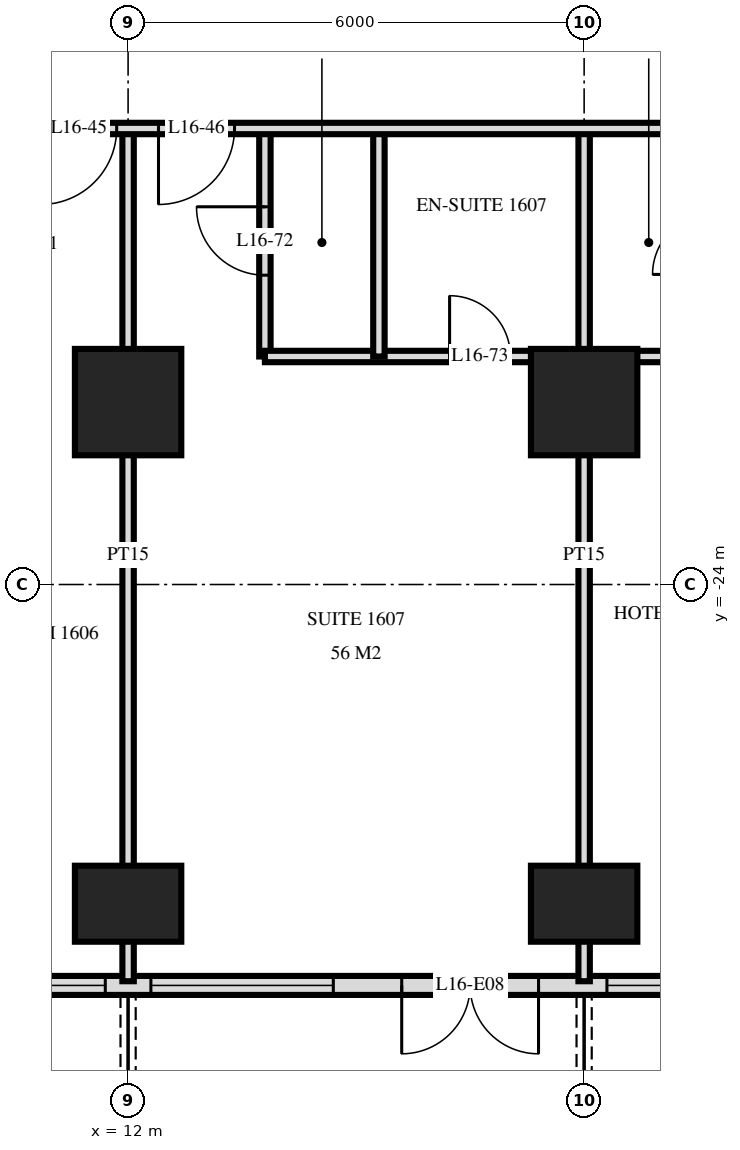
"""IFC4 building model, lengths in metres.
Left out: names, types, materials, properties, quantities, classifications, styles, units other than length and angle.
Written with IfcOpenShell. Run it as: python <this file> out.ifc"""

import sys

from ifc_helpers import new_model, si_unit, direction, frame, frame_2d, origin, origin_2d, place, context, subcontext, project, spatial, rectangle, extrude, element, fill, save


model = new_model("IFC4")
c1 = context("Model", 3, precision=1e-05, world=origin(), true_north=direction((0.0, 1.0)))
c2 = subcontext(c1, "Body", "Model", "MODEL_VIEW")
j1 = project(units=[si_unit("LENGTHUNIT", "METRE"), si_unit("PLANEANGLEUNIT", "RADIAN")], contexts=[c1])
p1 = place(None, origin())
s1 = spatial("IfcSite", under=j1, at=p1, CompositionType="ELEMENT")
p2 = place(p1, origin())
s2 = spatial("IfcBuilding", under=s1, at=p2, CompositionType="ELEMENT")
p3 = place(p2, frame((0.0, 0.0, 67.2)))
s3 = spatial("IfcBuildingStorey", under=s2, at=p3, CompositionType="ELEMENT", Elevation=67.2)
p4 = place(p3, frame((12.0, -28.2, 0.0), z_axis=(0.0, 0.0, 1.0), x_axis=(1.0, 0.0, 0.0)))
e1 = element("IfcColumn", 1, at=p4, inside=s3, PredefinedType="COLUMN", context=c2, shape_type="SweptSolid", body=[
    extrude(rectangle(XDim=1.4, YDim=1.0, at=origin_2d()), origin(), (0.0, 0.0, 1.0), 3.6),
])
p5 = place(p3, frame((12.0, -21.6, 0.0), z_axis=(0.0, 0.0, 1.0), x_axis=(1.0, 0.0, 0.0)))
e2 = element("IfcColumn", 2, at=p5, inside=s3, PredefinedType="COLUMN", context=c2, shape_type="SweptSolid", body=[
    extrude(rectangle(XDim=1.4, YDim=1.4, at=origin_2d()), origin(), (0.0, 0.0, 1.0), 3.6),
])
p6 = place(p3, frame((18.0, -28.2, 0.0), z_axis=(0.0, 0.0, 1.0), x_axis=(1.0, 0.0, 0.0)))
e3 = element("IfcColumn", 3, at=p6, inside=s3, PredefinedType="COLUMN", context=c2, shape_type="SweptSolid", body=[
    extrude(rectangle(XDim=1.4, YDim=1.0, at=origin_2d()), origin(), (0.0, 0.0, 1.0), 3.6),
])
p7 = place(p3, frame((18.0, -21.6, 0.0), z_axis=(0.0, 0.0, 1.0), x_axis=(1.0, 0.0, 0.0)))
e4 = element("IfcColumn", 4, at=p7, inside=s3, PredefinedType="COLUMN", context=c2, shape_type="SweptSolid", body=[
    extrude(rectangle(XDim=1.4, YDim=1.4, at=origin_2d()), origin(), (0.0, 0.0, 1.0), 3.6),
])
p8 = place(p3, frame((-28.775, -29.275, 0.0), z_axis=(0.0, 0.0, 1.0), x_axis=(1.0, 0.0, 0.0)))
e5 = element("IfcWall", 5, at=p8, inside=s3, PredefinedType="SOLIDWALL", context=c2, shape_type="SweptSolid", body=[
    extrude(rectangle(XDim=57.551, YDim=0.25, at=frame_2d((28.775, 0.0))), origin(), (0.0, 0.0, 1.0), 3.32),
])
p9 = place(p8, frame((0.575, 0.0, 0.0)))
e6 = element("IfcOpeningElement", 6, at=p9, cuts=e5, PredefinedType="OPENING", context=c2, shape_type="SweptSolid", body=[
    extrude(rectangle(XDim=1.8, YDim=2.4, at=frame_2d((0.9, 1.2))), frame((0.0, 0.135, 0.0), z_axis=(0.0, -1.0, 0.0), x_axis=(1.0, 0.0, 0.0)), (0.0, 0.0, 1.0), 0.27),
])
p10 = place(p8, frame((5.075, 0.0, 0.3)))
e7 = element("IfcOpeningElement", 7, at=p10, cuts=e5, PredefinedType="OPENING", context=c2, shape_type="SweptSolid", body=[
    extrude(rectangle(XDim=2.4, YDim=2.1, at=frame_2d((1.2, 1.05))), frame((0.0, 0.135, 0.0), z_axis=(0.0, -1.0, 0.0), x_axis=(1.0, 0.0, 0.0)), (0.0, 0.0, 1.0), 0.27),
])
p11 = place(p8, frame((8.375, 0.0, 0.0)))
e8 = element("IfcOpeningElement", 8, at=p11, cuts=e5, PredefinedType="OPENING", context=c2, shape_type="SweptSolid", body=[
    extrude(rectangle(XDim=1.8, YDim=2.4, at=frame_2d((0.9, 1.2))), frame((0.0, 0.135, 0.0), z_axis=(0.0, -1.0, 0.0), x_axis=(1.0, 0.0, 0.0)), (0.0, 0.0, 1.0), 0.27),
])
p12 = place(p8, frame((11.375, 0.0, 0.0)))
e9 = element("IfcOpeningElement", 9, at=p12, cuts=e5, PredefinedType="OPENING", context=c2, shape_type="SweptSolid", body=[
    extrude(rectangle(XDim=1.8, YDim=2.4, at=frame_2d((0.9, 1.2))), frame((0.0, 0.135, 0.0), z_axis=(0.0, -1.0, 0.0), x_axis=(1.0, 0.0, 0.0)), (0.0, 0.0, 1.0), 0.27),
])
p13 = place(p8, frame((14.075, 0.0, 0.3)))
e10 = element("IfcOpeningElement", 10, at=p13, cuts=e5, PredefinedType="OPENING", context=c2, shape_type="SweptSolid", body=[
    extrude(rectangle(XDim=2.4, YDim=2.1, at=frame_2d((1.2, 1.05))), frame((0.0, 0.135, 0.0), z_axis=(0.0, -1.0, 0.0), x_axis=(1.0, 0.0, 0.0)), (0.0, 0.0, 1.0), 0.27),
])
p14 = place(p8, frame((17.375, 0.0, 0.0)))
e11 = element("IfcOpeningElement", 11, at=p14, cuts=e5, PredefinedType="OPENING", context=c2, shape_type="SweptSolid", body=[
    extrude(rectangle(XDim=1.8, YDim=2.4, at=frame_2d((0.9, 1.2))), frame((0.0, 0.135, 0.0), z_axis=(0.0, -1.0, 0.0), x_axis=(1.0, 0.0, 0.0)), (0.0, 0.0, 1.0), 0.27),
])
p15 = place(p8, frame((20.075, 0.0, 0.3)))
e12 = element("IfcOpeningElement", 12, at=p15, cuts=e5, PredefinedType="OPENING", context=c2, shape_type="SweptSolid", body=[
    extrude(rectangle(XDim=2.4, YDim=2.1, at=frame_2d((1.2, 1.05))), frame((0.0, 0.135, 0.0), z_axis=(0.0, -1.0, 0.0), x_axis=(1.0, 0.0, 0.0)), (0.0, 0.0, 1.0), 0.27),
])
p16 = place(p8, frame((23.075, 0.0, 0.3)))
e13 = element("IfcOpeningElement", 13, at=p16, cuts=e5, PredefinedType="OPENING", context=c2, shape_type="SweptSolid", body=[
    extrude(rectangle(XDim=2.4, YDim=2.1, at=frame_2d((1.2, 1.05))), frame((0.0, 0.135, 0.0), z_axis=(0.0, -1.0, 0.0), x_axis=(1.0, 0.0, 0.0)), (0.0, 0.0, 1.0), 0.27),
])
p17 = place(p8, frame((26.375, 0.0, 0.0)))
e14 = element("IfcOpeningElement", 14, at=p17, cuts=e5, PredefinedType="OPENING", context=c2, shape_type="SweptSolid", body=[
    extrude(rectangle(XDim=1.8, YDim=2.4, at=frame_2d((0.9, 1.2))), frame((0.0, 0.135, 0.0), z_axis=(0.0, -1.0, 0.0), x_axis=(1.0, 0.0, 0.0)), (0.0, 0.0, 1.0), 0.27),
])
p18 = place(p8, frame((29.375, 0.0, 0.0)))
e15 = element("IfcOpeningElement", 15, at=p18, cuts=e5, PredefinedType="OPENING", context=c2, shape_type="SweptSolid", body=[
    extrude(rectangle(XDim=1.8, YDim=2.4, at=frame_2d((0.9, 1.2))), frame((0.0, 0.135, 0.0), z_axis=(0.0, -1.0, 0.0), x_axis=(1.0, 0.0, 0.0)), (0.0, 0.0, 1.0), 0.27),
])
p19 = place(p8, frame((32.075, 0.0, 0.3)))
e16 = element("IfcOpeningElement", 16, at=p19, cuts=e5, PredefinedType="OPENING", context=c2, shape_type="SweptSolid", body=[
    extrude(rectangle(XDim=2.4, YDim=2.1, at=frame_2d((1.2, 1.05))), frame((0.0, 0.135, 0.0), z_axis=(0.0, -1.0, 0.0), x_axis=(1.0, 0.0, 0.0)), (0.0, 0.0, 1.0), 0.27),
])
p20 = place(p8, frame((35.375, 0.0, 0.0)))
e17 = element("IfcOpeningElement", 17, at=p20, cuts=e5, PredefinedType="OPENING", context=c2, shape_type="SweptSolid", body=[
    extrude(rectangle(XDim=1.8, YDim=2.4, at=frame_2d((0.9, 1.2))), frame((0.0, 0.135, 0.0), z_axis=(0.0, -1.0, 0.0), x_axis=(1.0, 0.0, 0.0)), (0.0, 0.0, 1.0), 0.27),
])
p21 = place(p8, frame((38.075, 0.0, 0.3)))
e18 = element("IfcOpeningElement", 18, at=p21, cuts=e5, PredefinedType="OPENING", context=c2, shape_type="SweptSolid", body=[
    extrude(rectangle(XDim=2.4, YDim=2.1, at=frame_2d((1.2, 1.05))), frame((0.0, 0.135, 0.0), z_axis=(0.0, -1.0, 0.0), x_axis=(1.0, 0.0, 0.0)), (0.0, 0.0, 1.0), 0.27),
])
p22 = place(p8, frame((41.075, 0.0, 0.3)))
e19 = element("IfcOpeningElement", 19, at=p22, cuts=e5, PredefinedType="OPENING", context=c2, shape_type="SweptSolid", body=[
    extrude(rectangle(XDim=2.4, YDim=2.1, at=frame_2d((1.2, 1.05))), frame((0.0, 0.135, 0.0), z_axis=(0.0, -1.0, 0.0), x_axis=(1.0, 0.0, 0.0)), (0.0, 0.0, 1.0), 0.27),
])
p23 = place(p8, frame((44.375, 0.0, 0.0)))
e20 = element("IfcOpeningElement", 20, at=p23, cuts=e5, PredefinedType="OPENING", context=c2, shape_type="SweptSolid", body=[
    extrude(rectangle(XDim=1.8, YDim=2.4, at=frame_2d((0.9, 1.2))), frame((0.0, 0.135, 0.0), z_axis=(0.0, -1.0, 0.0), x_axis=(1.0, 0.0, 0.0)), (0.0, 0.0, 1.0), 0.27),
])
p24 = place(p8, frame((47.075, 0.0, 0.3)))
e21 = element("IfcOpeningElement", 21, at=p24, cuts=e5, PredefinedType="OPENING", context=c2, shape_type="SweptSolid", body=[
    extrude(rectangle(XDim=2.4, YDim=2.1, at=frame_2d((1.2, 1.05))), frame((0.0, 0.135, 0.0), z_axis=(0.0, -1.0, 0.0), x_axis=(1.0, 0.0, 0.0)), (0.0, 0.0, 1.0), 0.27),
])
p25 = place(p8, frame((50.375, 0.0, 0.0)))
e22 = element("IfcOpeningElement", 22, at=p25, cuts=e5, PredefinedType="OPENING", context=c2, shape_type="SweptSolid", body=[
    extrude(rectangle(XDim=1.8, YDim=2.4, at=frame_2d((0.9, 1.2))), frame((0.0, 0.135, 0.0), z_axis=(0.0, -1.0, 0.0), x_axis=(1.0, 0.0, 0.0)), (0.0, 0.0, 1.0), 0.27),
])
p26 = place(p8, frame((53.375, 0.0, 0.0)))
e23 = element("IfcOpeningElement", 23, at=p26, cuts=e5, PredefinedType="OPENING", context=c2, shape_type="SweptSolid", body=[
    extrude(rectangle(XDim=1.8, YDim=2.4, at=frame_2d((0.9, 1.2))), frame((0.0, 0.135, 0.0), z_axis=(0.0, -1.0, 0.0), x_axis=(1.0, 0.0, 0.0)), (0.0, 0.0, 1.0), 0.27),
])
p27 = place(p3, frame((18.0, -29.22, 0.0), z_axis=(0.0, 0.0, 1.0), x_axis=(0.0, 1.0, 0.0)))
e24 = element("IfcWall", 24, at=p27, inside=s3, PredefinedType="PARTITIONING", context=c2, shape_type="SweptSolid", body=[
    extrude(rectangle(XDim=11.22, YDim=0.15, at=frame_2d((5.61, 0.0))), origin(), (0.0, 0.0, 1.0), 3.32),
])
p28 = place(p3, frame((15.3, -21.0, 0.0), z_axis=(0.0, 0.0, 1.0), x_axis=(0.0, 1.0, 0.0)))
e25 = element("IfcWall", 25, at=p28, inside=s3, PredefinedType="PARTITIONING", context=c2, shape_type="SweptSolid", body=[
    extrude(rectangle(XDim=3.0, YDim=0.15, at=frame_2d((1.5, 0.0))), origin(), (0.0, 0.0, 1.0), 3.32),
])
p29 = place(p3, frame((13.8, -21.0, 0.0), z_axis=(0.0, 0.0, 1.0), x_axis=(0.0, 1.0, 0.0)))
e26 = element("IfcWall", 26, at=p29, inside=s3, PredefinedType="PARTITIONING", context=c2, shape_type="SweptSolid", body=[
    extrude(rectangle(XDim=3.0, YDim=0.15, at=frame_2d((1.5, 0.0))), origin(), (0.0, 0.0, 1.0), 3.32),
])
p30 = place(p29, frame((1.07, 0.0, 0.0)))
e27 = element("IfcOpeningElement", 27, at=p30, cuts=e26, PredefinedType="OPENING", context=c2, shape_type="SweptSolid", body=[
    extrude(rectangle(XDim=0.9, YDim=2.1, at=frame_2d((0.45, 1.05))), frame((0.0, 0.085, 0.0), z_axis=(0.0, -1.0, 0.0), x_axis=(1.0, 0.0, 0.0)), (0.0, 0.0, 1.0), 0.17),
])
p31 = place(p3, frame((12.0, -29.22, 0.0), z_axis=(0.0, 0.0, 1.0), x_axis=(0.0, 1.0, 0.0)))
e28 = element("IfcWall", 28, at=p31, inside=s3, PredefinedType="PARTITIONING", context=c2, shape_type="SweptSolid", body=[
    extrude(rectangle(XDim=11.22, YDim=0.15, at=frame_2d((5.61, 0.0))), origin(), (0.0, 0.0, 1.0), 3.32),
])
p32 = place(p3, frame((13.8, -21.0, 0.0), z_axis=(0.0, 0.0, 1.0), x_axis=(1.0, 0.0, 0.0)))
e29 = element("IfcWall", 29, at=p32, inside=s3, PredefinedType="PARTITIONING", context=c2, shape_type="SweptSolid", body=[
    extrude(rectangle(XDim=5.9, YDim=0.15, at=frame_2d((2.95, 0.0))), origin(), (0.0, 0.0, 1.0), 3.32),
])
p33 = place(p32, frame((2.43, 0.0, 0.0)))
e30 = element("IfcOpeningElement", 30, at=p33, cuts=e29, PredefinedType="OPENING", context=c2, shape_type="SweptSolid", body=[
    extrude(rectangle(XDim=0.8, YDim=2.1, at=frame_2d((0.4, 1.05))), frame((0.0, 0.085, 0.0), z_axis=(0.0, -1.0, 0.0), x_axis=(1.0, 0.0, 0.0)), (0.0, 0.0, 1.0), 0.17),
])
p34 = place(p3, frame((-33.12, -18.0, 0.0), z_axis=(0.0, 0.0, 1.0), x_axis=(1.0, 0.0, 0.0)))
e31 = element("IfcWall", 31, at=p34, inside=s3, PredefinedType="PARTITIONING", context=c2, shape_type="SweptSolid", body=[
    extrude(rectangle(XDim=66.24, YDim=0.15, at=frame_2d((33.12, 0.0))), origin(), (0.0, 0.0, 1.0), 3.32),
])
p35 = place(p34, frame((15.27, 0.0, 0.0)))
e32 = element("IfcOpeningElement", 32, at=p35, cuts=e31, PredefinedType="OPENING", context=c2, shape_type="SweptSolid", body=[
    extrude(rectangle(XDim=1.0, YDim=2.1, at=frame_2d((0.5, 1.05))), frame((0.0, 0.085, 0.0), z_axis=(0.0, -1.0, 0.0), x_axis=(1.0, 0.0, 0.0)), (0.0, 0.0, 1.0), 0.17),
])
p36 = place(p34, frame((21.22, 0.0, 0.0)))
e33 = element("IfcOpeningElement", 33, at=p36, cuts=e31, PredefinedType="OPENING", context=c2, shape_type="SweptSolid", body=[
    extrude(rectangle(XDim=1.0, YDim=2.1, at=frame_2d((0.5, 1.05))), frame((0.0, 0.085, 0.0), z_axis=(0.0, -1.0, 0.0), x_axis=(1.0, 0.0, 0.0)), (0.0, 0.0, 1.0), 0.17),
])
p37 = place(p34, frame((24.27, 0.0, 0.0)))
e34 = element("IfcOpeningElement", 34, at=p37, cuts=e31, PredefinedType="OPENING", context=c2, shape_type="SweptSolid", body=[
    extrude(rectangle(XDim=1.0, YDim=2.1, at=frame_2d((0.5, 1.05))), frame((0.0, 0.085, 0.0), z_axis=(0.0, -1.0, 0.0), x_axis=(1.0, 0.0, 0.0)), (0.0, 0.0, 1.0), 0.17),
])
p38 = place(p34, frame((30.97, 0.0, 0.0)))
e35 = element("IfcOpeningElement", 35, at=p38, cuts=e31, PredefinedType="OPENING", context=c2, shape_type="SweptSolid", body=[
    extrude(rectangle(XDim=1.0, YDim=2.1, at=frame_2d((0.5, 1.05))), frame((0.0, 0.085, 0.0), z_axis=(0.0, -1.0, 0.0), x_axis=(1.0, 0.0, 0.0)), (0.0, 0.0, 1.0), 0.17),
])
p39 = place(p34, frame((40.42, 0.0, 0.0)))
e36 = element("IfcOpeningElement", 36, at=p39, cuts=e31, PredefinedType="OPENING", context=c2, shape_type="SweptSolid", body=[
    extrude(rectangle(XDim=1.0, YDim=2.1, at=frame_2d((0.5, 1.05))), frame((0.0, 0.085, 0.0), z_axis=(0.0, -1.0, 0.0), x_axis=(1.0, 0.0, 0.0)), (0.0, 0.0, 1.0), 0.17),
])
p40 = place(p34, frame((43.97, 0.0, 0.0)))
e37 = element("IfcOpeningElement", 37, at=p40, cuts=e31, PredefinedType="OPENING", context=c2, shape_type="SweptSolid", body=[
    extrude(rectangle(XDim=1.0, YDim=2.1, at=frame_2d((0.5, 1.05))), frame((0.0, 0.085, 0.0), z_axis=(0.0, -1.0, 0.0), x_axis=(1.0, 0.0, 0.0)), (0.0, 0.0, 1.0), 0.17),
])
p41 = place(p34, frame((45.52, 0.0, 0.0)))
e38 = element("IfcOpeningElement", 38, at=p41, cuts=e31, PredefinedType="OPENING", context=c2, shape_type="SweptSolid", body=[
    extrude(rectangle(XDim=1.0, YDim=2.1, at=frame_2d((0.5, 1.05))), frame((0.0, 0.085, 0.0), z_axis=(0.0, -1.0, 0.0), x_axis=(1.0, 0.0, 0.0)), (0.0, 0.0, 1.0), 0.17),
])
p42 = place(p34, frame((52.97, 0.0, 0.0)))
e39 = element("IfcOpeningElement", 39, at=p42, cuts=e31, PredefinedType="OPENING", context=c2, shape_type="SweptSolid", body=[
    extrude(rectangle(XDim=1.0, YDim=2.1, at=frame_2d((0.5, 1.05))), frame((0.0, 0.085, 0.0), z_axis=(0.0, -1.0, 0.0), x_axis=(1.0, 0.0, 0.0)), (0.0, 0.0, 1.0), 0.17),
])
p43 = place(p34, frame((54.27, 0.0, 0.0)))
e40 = element("IfcOpeningElement", 40, at=p43, cuts=e31, PredefinedType="OPENING", context=c2, shape_type="SweptSolid", body=[
    extrude(rectangle(XDim=1.0, YDim=2.1, at=frame_2d((0.5, 1.05))), frame((0.0, 0.085, 0.0), z_axis=(0.0, -1.0, 0.0), x_axis=(1.0, 0.0, 0.0)), (0.0, 0.0, 1.0), 0.17),
])
p44 = place(p34, frame((13.42, 0.0, 0.0)))
e41 = element("IfcOpeningElement", 41, at=p44, cuts=e31, PredefinedType="OPENING", context=c2, shape_type="SweptSolid", body=[
    extrude(rectangle(XDim=1.0, YDim=2.1, at=frame_2d((0.5, 1.05))), frame((0.0, 0.085, 0.0), z_axis=(0.0, -1.0, 0.0), x_axis=(1.0, 0.0, 0.0)), (0.0, 0.0, 1.0), 0.17),
])
p45 = place(p34, frame((60.82, 0.0, 0.0)))
e42 = element("IfcOpeningElement", 42, at=p45, cuts=e31, PredefinedType="OPENING", context=c2, shape_type="SweptSolid", body=[
    extrude(rectangle(XDim=1.0, YDim=2.1, at=frame_2d((0.5, 1.05))), frame((0.0, 0.085, 0.0), z_axis=(0.0, -1.0, 0.0), x_axis=(1.0, 0.0, 0.0)), (0.0, 0.0, 1.0), 0.17),
])
p46 = place(p21, origin())
e43 = element("IfcWindow", 43, at=p46, inside=s3, PartitioningType="SINGLE_PANEL", PredefinedType="WINDOW", context=c2, shape_type="SweptSolid", body=[
    extrude(rectangle(XDim=2.4, YDim=2.1, at=frame_2d((1.2, 1.05))), frame((0.0, 0.03, 0.0), z_axis=(0.0, -1.0, 0.0), x_axis=(1.0, 0.0, 0.0)), (0.0, 0.0, 1.0), 0.06),
])
fill(e18, e43)
p47 = place(p22, origin())
e44 = element("IfcWindow", 44, at=p47, inside=s3, PartitioningType="SINGLE_PANEL", PredefinedType="WINDOW", context=c2, shape_type="SweptSolid", body=[
    extrude(rectangle(XDim=2.4, YDim=2.1, at=frame_2d((1.2, 1.05))), frame((0.0, 0.03, 0.0), z_axis=(0.0, -1.0, 0.0), x_axis=(1.0, 0.0, 0.0)), (0.0, 0.0, 1.0), 0.06),
])
fill(e19, e44)
p48 = place(p23, frame((0.9, 0.0, 0.0), z_axis=(0.0, 0.0, 1.0), x_axis=(-1.0, 0.0, 0.0)))
e45 = element("IfcDoor", 45, at=p48, inside=s3, OperationType="DOUBLE_DOOR_SINGLE_SWING", PredefinedType="DOOR", context=c2, shape_type="SweptSolid", body=[
    extrude(rectangle(XDim=1.8, YDim=2.4, at=frame_2d((0.0, 1.2))), frame((0.0, -0.025, 0.0), z_axis=(0.0, 1.0, 0.0), x_axis=(-1.0, 0.0, 0.0)), (0.0, 0.0, 1.0), 0.05),
])
fill(e20, e45)
p49 = place(p24, origin())
e46 = element("IfcWindow", 46, at=p49, inside=s3, PartitioningType="SINGLE_PANEL", PredefinedType="WINDOW", context=c2, shape_type="SweptSolid", body=[
    extrude(rectangle(XDim=2.4, YDim=2.1, at=frame_2d((1.2, 1.05))), frame((0.0, 0.03, 0.0), z_axis=(0.0, -1.0, 0.0), x_axis=(1.0, 0.0, 0.0)), (0.0, 0.0, 1.0), 0.06),
])
fill(e21, e46)
p50 = place(p40, frame((0.5, 0.0, 0.0), z_axis=(0.0, 0.0, 1.0), x_axis=(-1.0, 0.0, 0.0)))
e47 = element("IfcDoor", 47, at=p50, inside=s3, OperationType="SINGLE_SWING_LEFT", PredefinedType="DOOR", context=c2, shape_type="SweptSolid", body=[
    extrude(rectangle(XDim=1.0, YDim=2.1, at=frame_2d((0.0, 1.05))), frame((0.0, -0.025, 0.0), z_axis=(0.0, 1.0, 0.0), x_axis=(-1.0, 0.0, 0.0)), (0.0, 0.0, 1.0), 0.05),
])
fill(e37, e47)
p51 = place(p41, frame((0.5, 0.0, 0.0), z_axis=(0.0, 0.0, 1.0), x_axis=(-1.0, 0.0, 0.0)))
e48 = element("IfcDoor", 48, at=p51, inside=s3, OperationType="SINGLE_SWING_LEFT", PredefinedType="DOOR", context=c2, shape_type="SweptSolid", body=[
    extrude(rectangle(XDim=1.0, YDim=2.1, at=frame_2d((0.0, 1.05))), frame((0.0, -0.025, 0.0), z_axis=(0.0, 1.0, 0.0), x_axis=(-1.0, 0.0, 0.0)), (0.0, 0.0, 1.0), 0.05),
])
fill(e38, e48)
p52 = place(p30, origin())
e49 = element("IfcDoor", 49, at=p52, inside=s3, OperationType="SINGLE_SWING_LEFT", PredefinedType="DOOR", context=c2, shape_type="SweptSolid", body=[
    extrude(rectangle(XDim=0.9, YDim=2.1, at=frame_2d((0.45, 1.05))), frame((0.0, 0.025, 0.0), z_axis=(0.0, -1.0, 0.0), x_axis=(1.0, 0.0, 0.0)), (0.0, 0.0, 1.0), 0.05),
])
fill(e27, e49)
p53 = place(p33, origin())
e50 = element("IfcDoor", 50, at=p53, inside=s3, OperationType="SINGLE_SWING_RIGHT", PredefinedType="DOOR", context=c2, shape_type="SweptSolid", body=[
    extrude(rectangle(XDim=0.8, YDim=2.1, at=frame_2d((0.4, 1.05))), frame((0.0, 0.025, 0.0), z_axis=(0.0, -1.0, 0.0), x_axis=(1.0, 0.0, 0.0)), (0.0, 0.0, 1.0), 0.05),
])
fill(e30, e50)
save(model, sys.argv[1])
